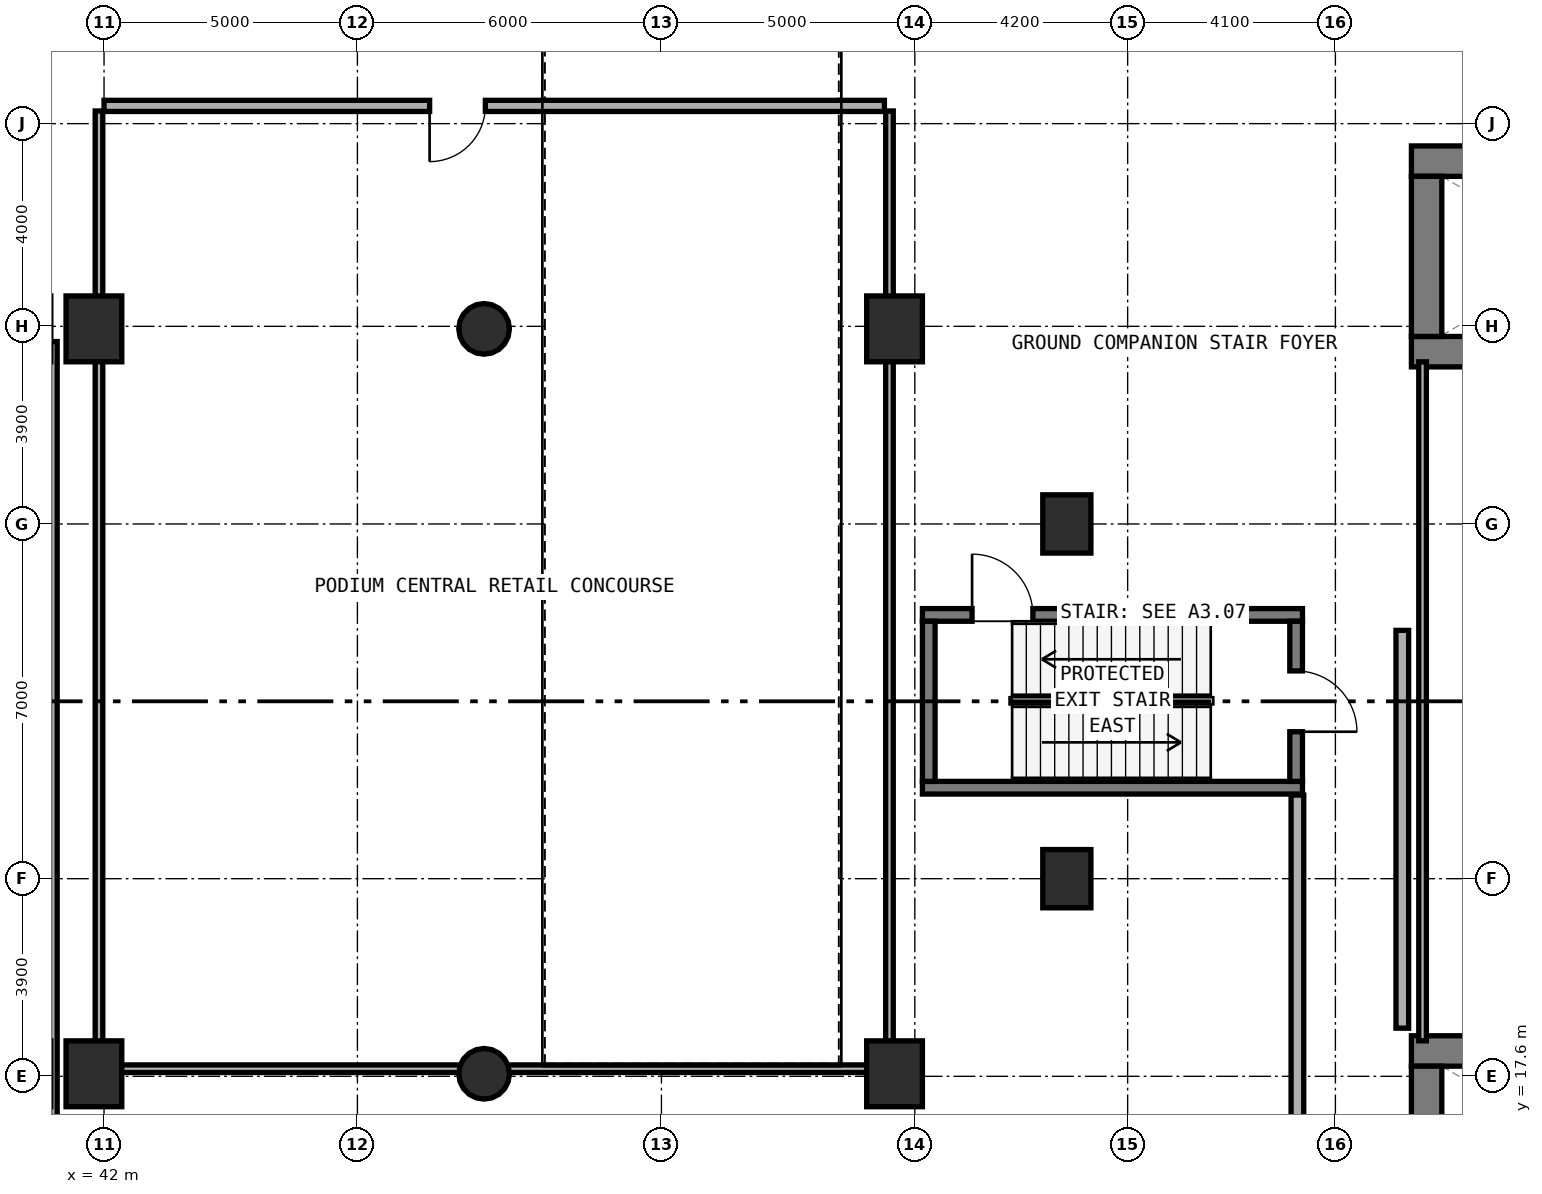
"""IFC4 building model, lengths in metres.
Left out: names, types, materials, properties, quantities, classifications, styles, units other than length and angle.
Written with IfcOpenShell. Run it as: python <this file> out.ifc"""

import sys

from ifc_helpers import new_model, si_unit, direction, frame, frame_2d, origin, origin_2d, place, context, subcontext, project, spatial, rectangle, circle, extrude, element, fill, save


model = new_model("IFC4")
c1 = context("Model", 3, precision=1e-05, world=origin(), true_north=direction((0.0, 1.0)))
c2 = subcontext(c1, "Body", "Model", "MODEL_VIEW")
j1 = project(units=[si_unit("LENGTHUNIT", "METRE"), si_unit("PLANEANGLEUNIT", "RADIAN")], contexts=[c1])
p1 = place(None, origin())
s1 = spatial("IfcSite", under=j1, at=p1, CompositionType="ELEMENT")
p2 = place(p1, origin())
s2 = spatial("IfcBuilding", under=s1, at=p2, CompositionType="ELEMENT")
p3 = place(p2, origin())
s3 = spatial("IfcBuildingStorey", under=s2, at=p3, CompositionType="ELEMENT", Elevation=0.0)
p4 = place(p3, frame((67.8, 31.9, 0.0), z_axis=(0.0, 0.0, 1.0), x_axis=(1.0, 0.0, 0.0)))
e1 = element("IfcWall", 1, at=p4, inside=s3, PredefinedType="SHEAR", context=c2, shape_type="SweptSolid", body=[
    extrude(rectangle(XDim=18.6, YDim=0.6, at=frame_2d((9.3, 0.0))), origin(), (0.0, 0.0, 1.0), 5.4),
])
p5 = place(p3, frame((67.8, 35.66, 0.0), z_axis=(0.0, 0.0, 1.0), x_axis=(1.0, 0.0, 0.0)))
e2 = element("IfcWall", 2, at=p5, inside=s3, PredefinedType="SHEAR", context=c2, shape_type="SweptSolid", body=[
    extrude(rectangle(XDim=18.6, YDim=0.6, at=frame_2d((9.3, 0.0))), origin(), (0.0, 0.0, 1.0), 5.4),
])
p6 = place(p5, frame((9.35, 0.0, 0.0)))
e3 = element("IfcOpeningElement", 3, at=p6, cuts=e2, PredefinedType="OPENING", context=c2, shape_type="SweptSolid", body=[
    extrude(rectangle(XDim=1.2, YDim=2.15, at=frame_2d((0.6, 1.075))), frame((0.0, 0.31, 0.0), z_axis=(0.0, -1.0, 0.0), x_axis=(1.0, 0.0, 0.0)), (0.0, 0.0, 1.0), 0.62),
])
p7 = place(p5, frame((6.15, 0.0, 0.0)))
e4 = element("IfcOpeningElement", 4, at=p7, cuts=e2, PredefinedType="OPENING", context=c2, shape_type="SweptSolid", body=[
    extrude(rectangle(XDim=1.3, YDim=2.15, at=frame_2d((0.65, 1.075))), frame((0.0, 0.31, 0.0), z_axis=(0.0, -1.0, 0.0), x_axis=(1.0, 0.0, 0.0)), (0.0, 0.0, 1.0), 0.62),
])
p8 = place(p5, frame((16.95, 0.0, 0.0)))
e5 = element("IfcOpeningElement", 5, at=p8, cuts=e2, PredefinedType="OPENING", context=c2, shape_type="SweptSolid", body=[
    extrude(rectangle(XDim=0.85, YDim=2.1, at=frame_2d((0.425, 1.05))), frame((0.0, 0.31, 0.0), z_axis=(0.0, -1.0, 0.0), x_axis=(1.0, 0.0, 0.0)), (0.0, 0.0, 1.0), 0.62),
])
p9 = place(p3, frame((68.1, 32.2, 0.0), z_axis=(0.0, 0.0, 1.0), x_axis=(0.0, 1.0, 0.0)))
e6 = element("IfcWall", 6, at=p9, inside=s3, PredefinedType="SHEAR", context=c2, shape_type="SweptSolid", body=[
    extrude(rectangle(XDim=3.16, YDim=0.6, at=frame_2d((1.58, 0.0))), origin(), (0.0, 0.0, 1.0), 5.4),
])
p10 = place(p3, frame((67.8, 18.1, 0.0), z_axis=(0.0, 0.0, 1.0), x_axis=(1.0, 0.0, 0.0)))
e7 = element("IfcWall", 7, at=p10, inside=s3, PredefinedType="SHEAR", context=c2, shape_type="SweptSolid", body=[
    extrude(rectangle(XDim=18.6, YDim=0.6, at=frame_2d((9.3, 0.0))), origin(), (0.0, 0.0, 1.0), 5.4),
])
p11 = place(p3, frame((68.1, 14.64, 0.0), z_axis=(0.0, 0.0, 1.0), x_axis=(0.0, 1.0, 0.0)))
e8 = element("IfcWall", 8, at=p11, inside=s3, PredefinedType="SHEAR", context=c2, shape_type="SweptSolid", body=[
    extrude(rectangle(XDim=3.16, YDim=0.6, at=frame_2d((1.58, 0.0))), origin(), (0.0, 0.0, 1.0), 5.4),
])
p12 = place(p3, frame((58.15, 23.295, 0.0), z_axis=(0.0, 0.0, 1.0), x_axis=(1.0, 0.0, 0.0)))
e9 = element("IfcWall", 9, at=p12, inside=s3, PredefinedType="STANDARD", context=c2, shape_type="SweptSolid", body=[
    extrude(rectangle(XDim=7.5, YDim=0.25, at=frame_2d((3.75, 0.0))), origin(), (0.0, 0.0, 1.0), 5.4),
])
p13 = place(p3, frame((58.15, 26.705, 0.0), z_axis=(0.0, 0.0, 1.0), x_axis=(1.0, 0.0, 0.0)))
e10 = element("IfcWall", 10, at=p13, inside=s3, PredefinedType="STANDARD", context=c2, shape_type="SweptSolid", body=[
    extrude(rectangle(XDim=7.5, YDim=0.25, at=frame_2d((3.75, 0.0))), origin(), (0.0, 0.0, 1.0), 5.4),
])
p14 = place(p13, frame((0.98, 0.0, 0.0)))
e11 = element("IfcOpeningElement", 11, at=p14, cuts=e10, PredefinedType="OPENING", context=c2, shape_type="SweptSolid", body=[
    extrude(rectangle(XDim=1.2, YDim=2.15, at=frame_2d((0.6, 1.075))), frame((0.0, 0.135, 0.0), z_axis=(0.0, -1.0, 0.0), x_axis=(1.0, 0.0, 0.0)), (0.0, 0.0, 1.0), 0.27),
])
p15 = place(p3, frame((58.275, 23.42, 0.0), z_axis=(0.0, 0.0, 1.0), x_axis=(0.0, 1.0, 0.0)))
e12 = element("IfcWall", 12, at=p15, inside=s3, PredefinedType="STANDARD", context=c2, shape_type="SweptSolid", body=[
    extrude(rectangle(XDim=3.16, YDim=0.25, at=frame_2d((1.58, 0.0))), origin(), (0.0, 0.0, 1.0), 5.4),
])
p16 = place(p3, frame((65.525, 23.42, 0.0), z_axis=(0.0, 0.0, 1.0), x_axis=(0.0, 1.0, 0.0)))
e13 = element("IfcWall", 13, at=p16, inside=s3, PredefinedType="STANDARD", context=c2, shape_type="SweptSolid", body=[
    extrude(rectangle(XDim=3.16, YDim=0.25, at=frame_2d((1.58, 0.0))), origin(), (0.0, 0.0, 1.0), 5.4),
])
p17 = place(p16, frame((0.98, 0.0, 0.0)))
e14 = element("IfcOpeningElement", 14, at=p17, cuts=e13, PredefinedType="OPENING", context=c2, shape_type="SweptSolid", body=[
    extrude(rectangle(XDim=1.2, YDim=2.15, at=frame_2d((0.6, 1.075))), frame((0.0, 0.135, 0.0), z_axis=(0.0, -1.0, 0.0), x_axis=(1.0, 0.0, 0.0)), (0.0, 0.0, 1.0), 0.27),
])
for number, where, z_axis, x_axis in (
    (15, (61.0, 21.5, 0.0), (0.0, 0.0, 1.0), (1.0, 0.0, 0.0)),
    (16, (61.0, 28.5, 0.0), (0.0, 0.0, 1.0), (1.0, 0.0, 0.0)),
):
    element("IfcColumn", number, at=place(p3, frame(where, z_axis=z_axis, x_axis=x_axis)), inside=s3, PredefinedType="COLUMN", context=c2, shape_type="SweptSolid", body=[
        extrude(rectangle(XDim=0.95, YDim=1.15, at=origin_2d()), origin(), (0.0, 0.0, 1.0), 5.4),
    ])
for number, where, z_axis, x_axis in (
    (17, (41.8, 17.65, 0.0), (0.0, 0.0, 1.0), (1.0, 0.0, 0.0)),
    (18, (41.8, 32.35, 0.0), (0.0, 0.0, 1.0), (1.0, 0.0, 0.0)),
):
    element("IfcColumn", number, at=place(p3, frame(where, z_axis=z_axis, x_axis=x_axis)), inside=s3, PredefinedType="COLUMN", context=c2, shape_type="SweptSolid", body=[
        extrude(rectangle(XDim=1.1, YDim=1.3, at=origin_2d()), origin(), (0.0, 0.0, 1.0), 5.4),
    ])
for number, where, z_axis, x_axis in (
    (19, (49.5, 17.65, 0.0), (0.0, 0.0, 1.0), (1.0, 0.0, 0.0)),
    (20, (49.5, 32.35, 0.0), (0.0, 0.0, 1.0), (1.0, 0.0, 0.0)),
):
    element("IfcColumn", number, at=place(p3, frame(where, z_axis=z_axis, x_axis=x_axis)), inside=s3, PredefinedType="COLUMN", context=c2, shape_type="SweptSolid", body=[
        extrude(circle(Radius=0.5, at=origin_2d()), origin(), (0.0, 0.0, 1.0), 5.4),
    ])
for number, where, z_axis, x_axis in (
    (21, (57.6, 17.65, 0.0), (0.0, 0.0, 1.0), (1.0, 0.0, 0.0)),
    (22, (57.6, 32.35, 0.0), (0.0, 0.0, 1.0), (1.0, 0.0, 0.0)),
):
    element("IfcColumn", number, at=place(p3, frame(where, z_axis=z_axis, x_axis=x_axis)), inside=s3, PredefinedType="COLUMN", context=c2, shape_type="SweptSolid", body=[
        extrude(rectangle(XDim=1.1, YDim=1.3, at=origin_2d()), origin(), (0.0, 0.0, 1.0), 5.4),
    ])
p18 = place(p3, frame((65.55, 0.48, 0.0), z_axis=(0.0, 0.0, 1.0), x_axis=(0.0, 1.0, 0.0)))
e23 = element("IfcWall", 23, at=p18, inside=s3, PredefinedType="SOLIDWALL", context=c2, shape_type="SweptSolid", body=[
    extrude(rectangle(XDim=22.67, YDim=0.25, at=frame_2d((11.335, 0.0))), origin(), (0.0, 0.0, 1.0), 4.225),
])
p19 = place(p3, frame((67.62, 18.55, 0.0), z_axis=(0.0, 0.0, 1.0), x_axis=(0.0, 1.0, 0.0)))
e24 = element("IfcWall", 24, at=p19, inside=s3, PredefinedType="SOLIDWALL", context=c2, shape_type="SweptSolid", body=[
    extrude(rectangle(XDim=7.85, YDim=0.25, at=frame_2d((3.925, 0.0))), origin(), (0.0, 0.0, 1.0), 4.525),
])
p20 = place(p3, frame((41.0, 13.35, 0.0), z_axis=(0.0, 0.0, 1.0), x_axis=(0.0, 1.0, 0.0)))
e25 = element("IfcWall", 25, at=p20, inside=s3, PredefinedType="PARTITIONING", context=c2, shape_type="SweptSolid", body=[
    extrude(rectangle(XDim=18.75, YDim=0.15, at=frame_2d((9.375, 0.0))), origin(), (0.0, 0.0, 1.0), 4.525),
])
p21 = place(p3, frame((41.9, 17.85, 0.0), z_axis=(0.0, 0.0, 1.0), x_axis=(0.0, 1.0, 0.0)))
e26 = element("IfcWall", 26, at=p21, inside=s3, PredefinedType="PARTITIONING", context=c2, shape_type="SweptSolid", body=[
    extrude(rectangle(XDim=18.8, YDim=0.15, at=frame_2d((9.4, 0.0))), origin(), (0.0, 0.0, 1.0), 4.325),
])
p22 = place(p3, frame((57.5, 17.85, 0.0), z_axis=(0.0, 0.0, 1.0), x_axis=(0.0, 1.0, 0.0)))
e27 = element("IfcWall", 27, at=p22, inside=s3, PredefinedType="PARTITIONING", context=c2, shape_type="SweptSolid", body=[
    extrude(rectangle(XDim=18.8, YDim=0.15, at=frame_2d((9.4, 0.0))), origin(), (0.0, 0.0, 1.0), 3.325),
])
p23 = place(p3, frame((42.0, 17.75, 0.0), z_axis=(0.0, 0.0, 1.0), x_axis=(1.0, 0.0, 0.0)))
e28 = element("IfcWall", 28, at=p23, inside=s3, PredefinedType="PARTITIONING", context=c2, shape_type="SweptSolid", body=[
    extrude(rectangle(XDim=15.4, YDim=0.15, at=frame_2d((7.7, 0.0))), origin(), (0.0, 0.0, 1.0), 4.325),
])
p24 = place(p3, frame((42.0, 36.75, 0.0), z_axis=(0.0, 0.0, 1.0), x_axis=(1.0, 0.0, 0.0)))
e29 = element("IfcWall", 29, at=p24, inside=s3, PredefinedType="SOLIDWALL", context=c2, shape_type="SweptSolid", body=[
    extrude(rectangle(XDim=15.4, YDim=0.22, at=frame_2d((7.7, 0.0))), origin(), (0.0, 0.0, 1.0), 5.05),
])
p25 = place(p24, frame((6.425, 0.0, 0.0)))
e30 = element("IfcOpeningElement", 30, at=p25, cuts=e29, PredefinedType="OPENING", context=c2, shape_type="SweptSolid", body=[
    extrude(rectangle(XDim=1.1, YDim=2.1, at=frame_2d((0.55, 1.05))), frame((0.0, 0.12, 0.0), z_axis=(0.0, -1.0, 0.0), x_axis=(1.0, 0.0, 0.0)), (0.0, 0.0, 1.0), 0.24),
])
p26 = place(p3, frame((68.02, 18.3, 0.0), z_axis=(0.0, 0.0, 1.0), x_axis=(0.0, 1.0, 0.0)))
e31 = element("IfcWall", 31, at=p26, inside=s3, PredefinedType="PARTITIONING", context=c2, shape_type="SweptSolid", body=[
    extrude(rectangle(XDim=13.4, YDim=0.15, at=frame_2d((6.7, 0.0))), origin(), (0.0, 0.0, 1.0), 4.525),
])
p27 = place(p14, origin())
e32 = element("IfcDoor", 32, at=p27, inside=s3, OperationType="SINGLE_SWING_LEFT", PredefinedType="DOOR", context=c2, shape_type="SweptSolid", body=[
    extrude(rectangle(XDim=1.2, YDim=2.15, at=frame_2d((0.6, 1.075))), frame((0.0, 0.025, 0.0), z_axis=(0.0, -1.0, 0.0), x_axis=(1.0, 0.0, 0.0)), (0.0, 0.0, 1.0), 0.05),
])
fill(e11, e32)
p28 = place(p17, frame((1.2, 0.0, 0.0), z_axis=(0.0, 0.0, 1.0), x_axis=(-1.0, 0.0, 0.0)))
e33 = element("IfcDoor", 33, at=p28, inside=s3, OperationType="SINGLE_SWING_RIGHT", PredefinedType="DOOR", context=c2, shape_type="SweptSolid", body=[
    extrude(rectangle(XDim=1.2, YDim=2.15, at=frame_2d((0.6, 1.075))), frame((0.0, 0.025, 0.0), z_axis=(0.0, -1.0, 0.0), x_axis=(1.0, 0.0, 0.0)), (0.0, 0.0, 1.0), 0.05),
])
fill(e14, e33)
p29 = place(p25, frame((1.1, 0.0, 0.0), z_axis=(0.0, 0.0, 1.0), x_axis=(-1.0, 0.0, 0.0)))
e34 = element("IfcDoor", 34, at=p29, inside=s3, OperationType="SINGLE_SWING_RIGHT", PredefinedType="DOOR", context=c2, shape_type="SweptSolid", body=[
    extrude(rectangle(XDim=1.1, YDim=2.1, at=frame_2d((0.55, 1.05))), frame((0.0, 0.025, 0.0), z_axis=(0.0, -1.0, 0.0), x_axis=(1.0, 0.0, 0.0)), (0.0, 0.0, 1.0), 0.05),
])
fill(e30, e34)
save(model, sys.argv[1])
